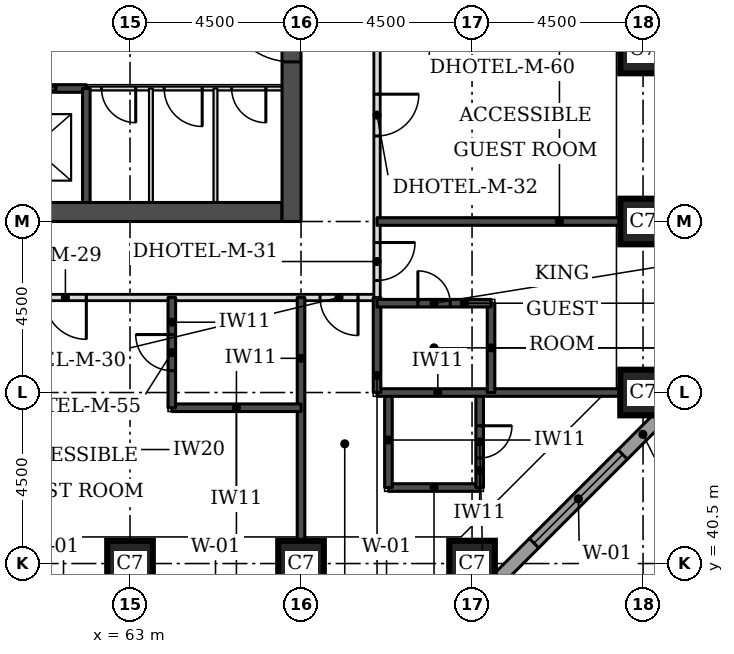
"""IFC4 building model, lengths in metres.
Left out: names, types, materials, properties, quantities, classifications, styles, units other than length and angle.
Written with IfcOpenShell. Run it as: python <this file> out.ifc"""

import sys

from ifc_helpers import new_model, si_unit, direction, frame, frame_2d, origin, origin_2d, place, context, subcontext, project, spatial, rectangle, extrude, element, fill, save


model = new_model("IFC4")
c1 = context("Model", 3, precision=1e-05, world=origin(), true_north=direction((0.0, 1.0)))
c2 = subcontext(c1, "Body", "Model", "MODEL_VIEW")
j1 = project(units=[si_unit("LENGTHUNIT", "METRE"), si_unit("PLANEANGLEUNIT", "RADIAN")], contexts=[c1])
p1 = place(None, origin())
s1 = spatial("IfcSite", under=j1, at=p1, CompositionType="ELEMENT")
p2 = place(p1, origin())
s2 = spatial("IfcBuilding", under=s1, at=p2, CompositionType="ELEMENT")
p3 = place(p2, frame((0.0, 0.0, 23.1)))
s3 = spatial("IfcBuildingStorey", under=s2, at=p3, CompositionType="ELEMENT", Elevation=23.1)
for number, where, z_axis, x_axis in (
    (1, (63.0, 40.5, 0.0), (0.0, 0.0, 1.0), (1.0, 0.0, 0.0)),
    (2, (67.5, 40.5, 0.0), (0.0, 0.0, 1.0), (1.0, 0.0, 0.0)),
    (3, (72.0, 40.5, 0.0), (0.0, 0.0, 1.0), (1.0, 0.0, 0.0)),
    (4, (76.5, 45.0, 0.0), (0.0, 0.0, 1.0), (1.0, 0.0, 0.0)),
    (5, (76.5, 49.5, 0.0), (0.0, 0.0, 1.0), (1.0, 0.0, 0.0)),
    (6, (76.5, 54.0, 0.0), (0.0, 0.0, 1.0), (1.0, 0.0, 0.0)),
):
    element("IfcColumn", number, at=place(p3, frame(where, z_axis=z_axis, x_axis=x_axis)), inside=s3, PredefinedType="COLUMN", context=c2, shape_type="SweptSolid", body=[
        extrude(rectangle(XDim=1.2, YDim=1.2, at=origin_2d()), origin(), (0.0, 0.0, 1.0), 3.3),
    ])
p4 = place(p3, frame((45.5, 49.75, 0.0), z_axis=(0.0, 0.0, 1.0), x_axis=(1.0, 0.0, 0.0)))
e7 = element("IfcWall", 7, at=p4, inside=s3, PredefinedType="SHEAR", context=c2, shape_type="SweptSolid", body=[
    extrude(rectangle(XDim=21.5, YDim=0.5, at=frame_2d((10.75, 0.0))), origin(), (0.0, 0.0, 1.0), 3.3),
])
p5 = place(p3, frame((67.25, 49.5, 0.0), z_axis=(0.0, 0.0, 1.0), x_axis=(0.0, 1.0, 0.0)))
e8 = element("IfcWall", 8, at=p5, inside=s3, PredefinedType="SHEAR", context=c2, shape_type="SweptSolid", body=[
    extrude(rectangle(XDim=22.5, YDim=0.5, at=frame_2d((11.25, 0.0))), origin(), (0.0, 0.0, 1.0), 3.3),
])
p6 = place(p5, frame((4.2, 0.0, 0.0)))
e9 = element("IfcOpeningElement", 9, at=p6, cuts=e8, PredefinedType="OPENING", context=c2, shape_type="SweptSolid", body=[
    extrude(rectangle(XDim=1.8, YDim=2.1, at=frame_2d((0.9, 1.05))), frame((0.0, 0.26, 0.0), z_axis=(0.0, -1.0, 0.0), x_axis=(1.0, 0.0, 0.0)), (0.0, 0.0, 1.0), 0.52),
])
p7 = place(p5, frame((6.9, 0.0, 0.0)))
e10 = element("IfcOpeningElement", 10, at=p7, cuts=e8, PredefinedType="OPENING", context=c2, shape_type="SweptSolid", body=[
    extrude(rectangle(XDim=1.1, YDim=2.1, at=frame_2d((0.55, 1.05))), frame((0.0, 0.26, 0.0), z_axis=(0.0, -1.0, 0.0), x_axis=(1.0, 0.0, 0.0)), (0.0, 0.0, 1.0), 0.52),
])
p8 = place(p5, frame((13.6, 0.0, 0.0)))
e11 = element("IfcOpeningElement", 11, at=p8, cuts=e8, PredefinedType="OPENING", context=c2, shape_type="SweptSolid", body=[
    extrude(rectangle(XDim=1.1, YDim=2.1, at=frame_2d((0.55, 1.05))), frame((0.0, 0.26, 0.0), z_axis=(0.0, -1.0, 0.0), x_axis=(1.0, 0.0, 0.0)), (0.0, 0.0, 1.0), 0.52),
])
p9 = place(p5, frame((16.5, 0.0, 0.0)))
e12 = element("IfcOpeningElement", 12, at=p9, cuts=e8, PredefinedType="OPENING", context=c2, shape_type="SweptSolid", body=[
    extrude(rectangle(XDim=1.8, YDim=2.1, at=frame_2d((0.9, 1.05))), frame((0.0, 0.26, 0.0), z_axis=(0.0, -1.0, 0.0), x_axis=(1.0, 0.0, 0.0)), (0.0, 0.0, 1.0), 0.52),
])
p10 = place(p3, frame((72.27, 39.674, 0.0), z_axis=(0.0, 0.0, 1.0), x_axis=(0.707106781187, 0.707106781187, 0.0)))
e13 = element("IfcWall", 13, at=p10, inside=s3, PredefinedType="STANDARD", context=c2, shape_type="SweptSolid", body=[
    extrude(rectangle(XDim=7.151, YDim=0.35, at=frame_2d((3.576, 0.0))), origin(), (0.0, 0.0, 1.0), 3.055),
])
p11 = place(p10, frame((1.926, 0.0, 0.8)))
e14 = element("IfcOpeningElement", 14, at=p11, cuts=e13, PredefinedType="OPENING", context=c2, shape_type="SweptSolid", body=[
    extrude(rectangle(XDim=3.3, YDim=1.5, at=frame_2d((1.65, 0.75))), frame((0.0, 0.185, 0.0), z_axis=(0.0, -1.0, 0.0), x_axis=(1.0, 0.0, 0.0)), (0.0, 0.0, 1.0), 0.37),
])
p12 = place(p3, frame((52.1, 47.5, 0.0), z_axis=(0.0, 0.0, 1.0), x_axis=(1.0, 0.0, 0.0)))
e15 = element("IfcWall", 15, at=p12, inside=s3, PredefinedType="PARTITIONING", context=c2, shape_type="SweptSolid", body=[
    extrude(rectangle(XDim=17.4, YDim=0.15, at=frame_2d((8.7, 0.0))), origin(), (0.0, 0.0, 1.0), 3.08),
])
p13 = place(p12, frame((8.65, 0.0, 0.0)))
e16 = element("IfcOpeningElement", 16, at=p13, cuts=e15, PredefinedType="OPENING", context=c2, shape_type="SweptSolid", body=[
    extrude(rectangle(XDim=1.1, YDim=2.1, at=frame_2d((0.55, 1.05))), frame((0.0, 0.085, 0.0), z_axis=(0.0, -1.0, 0.0), x_axis=(1.0, 0.0, 0.0)), (0.0, 0.0, 1.0), 0.17),
])
p14 = place(p12, frame((15.9, 0.0, 0.0)))
e17 = element("IfcOpeningElement", 17, at=p14, cuts=e15, PredefinedType="OPENING", context=c2, shape_type="SweptSolid", body=[
    extrude(rectangle(XDim=1.0, YDim=2.1, at=frame_2d((0.5, 1.05))), frame((0.0, 0.085, 0.0), z_axis=(0.0, -1.0, 0.0), x_axis=(1.0, 0.0, 0.0)), (0.0, 0.0, 1.0), 0.17),
])
p15 = place(p3, frame((69.5, 47.5, 0.0), z_axis=(0.0, 0.0, 1.0), x_axis=(0.0, 1.0, 0.0)))
e18 = element("IfcWall", 18, at=p15, inside=s3, PredefinedType="PARTITIONING", context=c2, shape_type="SweptSolid", body=[
    extrude(rectangle(XDim=26.5, YDim=0.15, at=frame_2d((13.25, 0.0))), origin(), (0.0, 0.0, 1.0), 3.08),
])
p16 = place(p15, frame((25.053, 0.0, 0.0)))
e19 = element("IfcOpeningElement", 19, at=p16, cuts=e18, PredefinedType="OPENING", context=c2, shape_type="SweptSolid", body=[
    extrude(rectangle(XDim=1.0, YDim=2.1, at=frame_2d((0.5, 1.05))), frame((0.0, 0.085, 0.0), z_axis=(0.0, -1.0, 0.0), x_axis=(1.0, 0.0, 0.0)), (0.0, 0.0, 1.0), 0.17),
])
p17 = place(p15, frame((22.925, 0.0, 0.0)))
e20 = element("IfcOpeningElement", 20, at=p17, cuts=e18, PredefinedType="OPENING", context=c2, shape_type="SweptSolid", body=[
    extrude(rectangle(XDim=1.0, YDim=2.1, at=frame_2d((0.5, 1.05))), frame((0.0, 0.085, 0.0), z_axis=(0.0, -1.0, 0.0), x_axis=(1.0, 0.0, 0.0)), (0.0, 0.0, 1.0), 0.17),
])
p18 = place(p15, frame((16.325, 0.0, 0.0)))
e21 = element("IfcOpeningElement", 21, at=p18, cuts=e18, PredefinedType="OPENING", context=c2, shape_type="SweptSolid", body=[
    extrude(rectangle(XDim=1.0, YDim=2.1, at=frame_2d((0.5, 1.05))), frame((0.0, 0.085, 0.0), z_axis=(0.0, -1.0, 0.0), x_axis=(1.0, 0.0, 0.0)), (0.0, 0.0, 1.0), 0.17),
])
p19 = place(p15, frame((13.925, 0.0, 0.0)))
e22 = element("IfcOpeningElement", 22, at=p19, cuts=e18, PredefinedType="OPENING", context=c2, shape_type="SweptSolid", body=[
    extrude(rectangle(XDim=1.0, YDim=2.1, at=frame_2d((0.5, 1.05))), frame((0.0, 0.085, 0.0), z_axis=(0.0, -1.0, 0.0), x_axis=(1.0, 0.0, 0.0)), (0.0, 0.0, 1.0), 0.17),
])
p20 = place(p15, frame((4.25, 0.0, 0.0)))
e23 = element("IfcOpeningElement", 23, at=p20, cuts=e18, PredefinedType="OPENING", context=c2, shape_type="SweptSolid", body=[
    extrude(rectangle(XDim=1.1, YDim=2.1, at=frame_2d((0.55, 1.05))), frame((0.0, 0.085, 0.0), z_axis=(0.0, -1.0, 0.0), x_axis=(1.0, 0.0, 0.0)), (0.0, 0.0, 1.0), 0.17),
])
p21 = place(p15, frame((0.447, 0.0, 0.0)))
e24 = element("IfcOpeningElement", 24, at=p21, cuts=e18, PredefinedType="OPENING", context=c2, shape_type="SweptSolid", body=[
    extrude(rectangle(XDim=1.0, YDim=2.1, at=frame_2d((0.5, 1.05))), frame((0.0, 0.085, 0.0), z_axis=(0.0, -1.0, 0.0), x_axis=(1.0, 0.0, 0.0)), (0.0, 0.0, 1.0), 0.17),
])
p22 = place(p3, frame((67.5, 41.1, 0.0), z_axis=(0.0, 0.0, 1.0), x_axis=(0.0, 1.0, 0.0)))
e25 = element("IfcWall", 25, at=p22, inside=s3, PredefinedType="SOLIDWALL", context=c2, shape_type="SweptSolid", body=[
    extrude(rectangle(XDim=6.4, YDim=0.2, at=frame_2d((3.2, 0.0))), origin(), (0.0, 0.0, 1.0), 3.08),
])
p23 = place(p3, frame((69.8, 42.5, 0.0), z_axis=(0.0, 0.0, 1.0), x_axis=(1.0, 0.0, 0.0)))
e26 = element("IfcWall", 26, at=p23, inside=s3, PredefinedType="SOLIDWALL", context=c2, shape_type="SweptSolid", body=[
    extrude(rectangle(XDim=2.4, YDim=0.2, at=frame_2d((1.2, 0.0))), origin(), (0.0, 0.0, 1.0), 3.08),
])
p24 = place(p3, frame((69.8, 42.5, 0.0), z_axis=(0.0, 0.0, 1.0), x_axis=(0.0, 1.0, 0.0)))
e27 = element("IfcWall", 27, at=p24, inside=s3, PredefinedType="SOLIDWALL", context=c2, shape_type="SweptSolid", body=[
    extrude(rectangle(XDim=2.5, YDim=0.2, at=frame_2d((1.25, 0.0))), origin(), (0.0, 0.0, 1.0), 3.08),
])
p25 = place(p3, frame((72.2, 42.5, 0.0), z_axis=(0.0, 0.0, 1.0), x_axis=(0.0, 1.0, 0.0)))
e28 = element("IfcWall", 28, at=p25, inside=s3, PredefinedType="SOLIDWALL", context=c2, shape_type="SweptSolid", body=[
    extrude(rectangle(XDim=2.5, YDim=0.2, at=frame_2d((1.25, 0.0))), origin(), (0.0, 0.0, 1.0), 3.08),
])
p26 = place(p25, frame((0.775, 0.0, 0.0)))
e29 = element("IfcOpeningElement", 29, at=p26, cuts=e28, PredefinedType="OPENING", context=c2, shape_type="SweptSolid", body=[
    extrude(rectangle(XDim=0.85, YDim=2.1, at=frame_2d((0.425, 1.05))), frame((0.0, 0.11, 0.0), z_axis=(0.0, -1.0, 0.0), x_axis=(1.0, 0.0, 0.0)), (0.0, 0.0, 1.0), 0.22),
])
p27 = place(p3, frame((64.1, 44.6, 0.0), z_axis=(0.0, 0.0, 1.0), x_axis=(1.0, 0.0, 0.0)))
e30 = element("IfcWall", 30, at=p27, inside=s3, PredefinedType="SOLIDWALL", context=c2, shape_type="SweptSolid", body=[
    extrude(rectangle(XDim=3.4, YDim=0.2, at=frame_2d((1.7, 0.0))), origin(), (0.0, 0.0, 1.0), 3.08),
])
p28 = place(p3, frame((64.1, 44.6, 0.0), z_axis=(0.0, 0.0, 1.0), x_axis=(0.0, 1.0, 0.0)))
e31 = element("IfcWall", 31, at=p28, inside=s3, PredefinedType="SOLIDWALL", context=c2, shape_type="SweptSolid", body=[
    extrude(rectangle(XDim=2.9, YDim=0.2, at=frame_2d((1.45, 0.0))), origin(), (0.0, 0.0, 1.0), 3.08),
])
p29 = place(p28, frame((0.975, 0.0, 0.0)))
e32 = element("IfcOpeningElement", 32, at=p29, cuts=e31, PredefinedType="OPENING", context=c2, shape_type="SweptSolid", body=[
    extrude(rectangle(XDim=0.95, YDim=2.1, at=frame_2d((0.475, 1.05))), frame((0.0, 0.11, 0.0), z_axis=(0.0, -1.0, 0.0), x_axis=(1.0, 0.0, 0.0)), (0.0, 0.0, 1.0), 0.22),
])
p30 = place(p3, frame((69.5, 45.0, 0.0), z_axis=(0.0, 0.0, 1.0), x_axis=(1.0, 0.0, 0.0)))
e33 = element("IfcWall", 33, at=p30, inside=s3, PredefinedType="SOLIDWALL", context=c2, shape_type="SweptSolid", body=[
    extrude(rectangle(XDim=6.4, YDim=0.2, at=frame_2d((3.2, 0.0))), origin(), (0.0, 0.0, 1.0), 3.08),
])
p31 = place(p3, frame((69.5, 45.0, 0.0), z_axis=(0.0, 0.0, 1.0), x_axis=(0.0, 1.0, 0.0)))
e34 = element("IfcWall", 34, at=p31, inside=s3, PredefinedType="SOLIDWALL", context=c2, shape_type="SweptSolid", body=[
    extrude(rectangle(XDim=2.5, YDim=0.2, at=frame_2d((1.25, 0.0))), origin(), (0.0, 0.0, 1.0), 3.08),
])
p32 = place(p3, frame((72.5, 45.0, 0.0), z_axis=(0.0, 0.0, 1.0), x_axis=(0.0, 1.0, 0.0)))
e35 = element("IfcWall", 35, at=p32, inside=s3, PredefinedType="SOLIDWALL", context=c2, shape_type="SweptSolid", body=[
    extrude(rectangle(XDim=2.35, YDim=0.2, at=frame_2d((1.175, 0.0))), origin(), (0.0, 0.0, 1.0), 3.08),
])
p33 = place(p3, frame((69.5, 47.35, 0.0), z_axis=(0.0, 0.0, 1.0), x_axis=(1.0, 0.0, 0.0)))
e36 = element("IfcWall", 36, at=p33, inside=s3, PredefinedType="SOLIDWALL", context=c2, shape_type="SweptSolid", body=[
    extrude(rectangle(XDim=3.0, YDim=0.2, at=frame_2d((1.5, 0.0))), origin(), (0.0, 0.0, 1.0), 3.08),
])
p34 = place(p33, frame((1.075, 0.0, 0.0)))
e37 = element("IfcOpeningElement", 37, at=p34, cuts=e36, PredefinedType="OPENING", context=c2, shape_type="SweptSolid", body=[
    extrude(rectangle(XDim=0.85, YDim=2.1, at=frame_2d((0.425, 1.05))), frame((0.0, 0.11, 0.0), z_axis=(0.0, -1.0, 0.0), x_axis=(1.0, 0.0, 0.0)), (0.0, 0.0, 1.0), 0.22),
])
p35 = place(p3, frame((69.5, 49.5, 0.0), z_axis=(0.0, 0.0, 1.0), x_axis=(1.0, 0.0, 0.0)))
e38 = element("IfcWall", 38, at=p35, inside=s3, PredefinedType="SOLIDWALL", context=c2, shape_type="SweptSolid", body=[
    extrude(rectangle(XDim=6.4, YDim=0.2, at=frame_2d((3.2, 0.0))), origin(), (0.0, 0.0, 1.0), 3.08),
])
p36 = place(p3, frame((61.85, 53.0, 0.0), z_axis=(0.0, 0.0, 1.0), x_axis=(1.0, 0.0, 0.0)))
e39 = element("IfcWall", 39, at=p36, inside=s3, PredefinedType="PARTITIONING", context=c2, shape_type="SweptSolid", body=[
    extrude(rectangle(XDim=5.15, YDim=0.1, at=frame_2d((2.575, 0.0))), origin(), (0.0, 0.0, 1.0), 3.08),
])
p37 = place(p36, frame((3.824, 0.0, 0.0)))
e40 = element("IfcOpeningElement", 40, at=p37, cuts=e39, PredefinedType="OPENING", context=c2, shape_type="SweptSolid", body=[
    extrude(rectangle(XDim=0.9, YDim=2.1, at=frame_2d((0.45, 1.05))), frame((0.0, 0.06, 0.0), z_axis=(0.0, -1.0, 0.0), x_axis=(1.0, 0.0, 0.0)), (0.0, 0.0, 1.0), 0.12),
])
p38 = place(p36, frame((2.049, 0.0, 0.0)))
e41 = element("IfcOpeningElement", 41, at=p38, cuts=e39, PredefinedType="OPENING", context=c2, shape_type="SweptSolid", body=[
    extrude(rectangle(XDim=1.0, YDim=2.1, at=frame_2d((0.5, 1.05))), frame((0.0, 0.06, 0.0), z_axis=(0.0, -1.0, 0.0), x_axis=(1.0, 0.0, 0.0)), (0.0, 0.0, 1.0), 0.12),
])
p39 = place(p36, frame((0.4, 0.0, 0.0)))
e42 = element("IfcOpeningElement", 42, at=p39, cuts=e39, PredefinedType="OPENING", context=c2, shape_type="SweptSolid", body=[
    extrude(rectangle(XDim=0.9, YDim=2.1, at=frame_2d((0.45, 1.05))), frame((0.0, 0.06, 0.0), z_axis=(0.0, -1.0, 0.0), x_axis=(1.0, 0.0, 0.0)), (0.0, 0.0, 1.0), 0.12),
])
p40 = place(p3, frame((50.65, 53.0, 0.0), z_axis=(0.0, 0.0, 1.0), x_axis=(1.0, 0.0, 0.0)))
e43 = element("IfcWall", 43, at=p40, inside=s3, PredefinedType="SOLIDWALL", context=c2, shape_type="SweptSolid", body=[
    extrude(rectangle(XDim=11.2, YDim=0.2, at=frame_2d((5.6, 0.0))), origin(), (0.0, 0.0, 1.0), 3.08),
])
p41 = place(p40, frame((0.8, 0.0, 0.0)))
e44 = element("IfcOpeningElement", 44, at=p41, cuts=e43, PredefinedType="OPENING", context=c2, shape_type="SweptSolid", body=[
    extrude(rectangle(XDim=1.2, YDim=2.1, at=frame_2d((0.6, 1.05))), frame((0.0, 0.11, 0.0), z_axis=(0.0, -1.0, 0.0), x_axis=(1.0, 0.0, 0.0)), (0.0, 0.0, 1.0), 0.22),
])
p42 = place(p40, frame((3.6, 0.0, 0.0)))
e45 = element("IfcOpeningElement", 45, at=p42, cuts=e43, PredefinedType="OPENING", context=c2, shape_type="SweptSolid", body=[
    extrude(rectangle(XDim=1.2, YDim=2.1, at=frame_2d((0.6, 1.05))), frame((0.0, 0.11, 0.0), z_axis=(0.0, -1.0, 0.0), x_axis=(1.0, 0.0, 0.0)), (0.0, 0.0, 1.0), 0.22),
])
p43 = place(p40, frame((6.4, 0.0, 0.0)))
e46 = element("IfcOpeningElement", 46, at=p43, cuts=e43, PredefinedType="OPENING", context=c2, shape_type="SweptSolid", body=[
    extrude(rectangle(XDim=1.2, YDim=2.1, at=frame_2d((0.6, 1.05))), frame((0.0, 0.11, 0.0), z_axis=(0.0, -1.0, 0.0), x_axis=(1.0, 0.0, 0.0)), (0.0, 0.0, 1.0), 0.22),
])
p44 = place(p40, frame((9.2, 0.0, 0.0)))
e47 = element("IfcOpeningElement", 47, at=p44, cuts=e43, PredefinedType="OPENING", context=c2, shape_type="SweptSolid", body=[
    extrude(rectangle(XDim=1.2, YDim=2.1, at=frame_2d((0.6, 1.05))), frame((0.0, 0.11, 0.0), z_axis=(0.0, -1.0, 0.0), x_axis=(1.0, 0.0, 0.0)), (0.0, 0.0, 1.0), 0.22),
])
p45 = place(p3, frame((61.85, 50.0, 0.0), z_axis=(0.0, 0.0, 1.0), x_axis=(0.0, 1.0, 0.0)))
e48 = element("IfcWall", 48, at=p45, inside=s3, PredefinedType="SOLIDWALL", context=c2, shape_type="SweptSolid", body=[
    extrude(rectangle(XDim=3.0, YDim=0.2, at=frame_2d((1.5, 0.0))), origin(), (0.0, 0.0, 1.0), 3.08),
])
for number, where, z_axis, x_axis in (
    (49, (63.55, 50.0, 0.0), (0.0, 0.0, 1.0), (0.0, 1.0, 0.0)),
    (50, (65.249, 50.0, 0.0), (0.0, 0.0, 1.0), (0.0, 1.0, 0.0)),
):
    element("IfcWall", number, at=place(p3, frame(where, z_axis=z_axis, x_axis=x_axis)), inside=s3, PredefinedType="PARTITIONING", context=c2, shape_type="SweptSolid", body=[
        extrude(rectangle(XDim=3.0, YDim=0.1, at=frame_2d((1.5, 0.0))), origin(), (0.0, 0.0, 1.0), 3.08),
    ])
p46 = place(p11, origin())
e51 = element("IfcWindow", 51, at=p46, inside=s3, PartitioningType="SINGLE_PANEL", PredefinedType="WINDOW", context=c2, shape_type="SweptSolid", body=[
    extrude(rectangle(XDim=3.3, YDim=1.5, at=frame_2d((1.65, 0.75))), frame((0.0, 0.085, 0.0), z_axis=(0.0, -1.0, 0.0), x_axis=(1.0, 0.0, 0.0)), (0.0, 0.0, 1.0), 0.06),
])
fill(e14, e51)
p47 = place(p20, frame((1.1, 0.0, 0.0), z_axis=(0.0, 0.0, 1.0), x_axis=(-1.0, 0.0, 0.0)))
e52 = element("IfcDoor", 52, at=p47, inside=s3, OperationType="SINGLE_SWING_LEFT", PredefinedType="DOOR", context=c2, shape_type="SweptSolid", body=[
    extrude(rectangle(XDim=1.1, YDim=2.1, at=frame_2d((0.55, 1.05))), frame((0.0, 0.025, 0.0), z_axis=(0.0, -1.0, 0.0), x_axis=(1.0, 0.0, 0.0)), (0.0, 0.0, 1.0), 0.05),
])
fill(e23, e52)
p48 = place(p21, frame((1.0, 0.0, 0.0), z_axis=(0.0, 0.0, 1.0), x_axis=(-1.0, 0.0, 0.0)))
e53 = element("IfcDoor", 53, at=p48, inside=s3, OperationType="SINGLE_SWING_LEFT", PredefinedType="DOOR", context=c2, shape_type="SweptSolid", body=[
    extrude(rectangle(XDim=1.0, YDim=2.1, at=frame_2d((0.5, 1.05))), frame((0.0, 0.025, 0.0), z_axis=(0.0, -1.0, 0.0), x_axis=(1.0, 0.0, 0.0)), (0.0, 0.0, 1.0), 0.05),
])
fill(e24, e53)
p49 = place(p34, origin())
e54 = element("IfcDoor", 54, at=p49, inside=s3, OperationType="SINGLE_SWING_LEFT", PredefinedType="DOOR", context=c2, shape_type="SweptSolid", body=[
    extrude(rectangle(XDim=0.85, YDim=2.1, at=frame_2d((0.425, 1.05))), frame((0.0, 0.025, 0.0), z_axis=(0.0, -1.0, 0.0), x_axis=(1.0, 0.0, 0.0)), (0.0, 0.0, 1.0), 0.05),
])
fill(e37, e54)
p50 = place(p13, frame((1.1, 0.0, 0.0), z_axis=(0.0, 0.0, 1.0), x_axis=(-1.0, 0.0, 0.0)))
e55 = element("IfcDoor", 55, at=p50, inside=s3, OperationType="SINGLE_SWING_LEFT", PredefinedType="DOOR", context=c2, shape_type="SweptSolid", body=[
    extrude(rectangle(XDim=1.1, YDim=2.1, at=frame_2d((0.55, 1.05))), frame((0.0, 0.025, 0.0), z_axis=(0.0, -1.0, 0.0), x_axis=(1.0, 0.0, 0.0)), (0.0, 0.0, 1.0), 0.05),
])
fill(e16, e55)
p51 = place(p29, origin())
e56 = element("IfcDoor", 56, at=p51, inside=s3, OperationType="SINGLE_SWING_RIGHT", PredefinedType="DOOR", context=c2, shape_type="SweptSolid", body=[
    extrude(rectangle(XDim=0.95, YDim=2.1, at=frame_2d((0.475, 1.05))), frame((0.0, 0.025, 0.0), z_axis=(0.0, -1.0, 0.0), x_axis=(1.0, 0.0, 0.0)), (0.0, 0.0, 1.0), 0.05),
])
fill(e32, e56)
p52 = place(p14, frame((1.0, 0.0, 0.0), z_axis=(0.0, 0.0, 1.0), x_axis=(-1.0, 0.0, 0.0)))
e57 = element("IfcDoor", 57, at=p52, inside=s3, OperationType="SINGLE_SWING_LEFT", PredefinedType="DOOR", context=c2, shape_type="SweptSolid", body=[
    extrude(rectangle(XDim=1.0, YDim=2.1, at=frame_2d((0.5, 1.05))), frame((0.0, 0.025, 0.0), z_axis=(0.0, -1.0, 0.0), x_axis=(1.0, 0.0, 0.0)), (0.0, 0.0, 1.0), 0.05),
])
fill(e17, e57)
p53 = place(p26, frame((0.85, 0.0, 0.0), z_axis=(0.0, 0.0, 1.0), x_axis=(-1.0, 0.0, 0.0)))
e58 = element("IfcDoor", 58, at=p53, inside=s3, OperationType="SINGLE_SWING_LEFT", PredefinedType="DOOR", context=c2, shape_type="SweptSolid", body=[
    extrude(rectangle(XDim=0.85, YDim=2.1, at=frame_2d((0.425, 1.05))), frame((0.0, 0.025, 0.0), z_axis=(0.0, -1.0, 0.0), x_axis=(1.0, 0.0, 0.0)), (0.0, 0.0, 1.0), 0.05),
])
fill(e29, e58)
p54 = place(p44, origin())
e59 = element("IfcDoor", 59, at=p54, inside=s3, OperationType="DOUBLE_DOOR_SLIDING", PredefinedType="DOOR", context=c2, shape_type="SweptSolid", body=[
    extrude(rectangle(XDim=1.2, YDim=2.1, at=frame_2d((0.6, 1.05))), frame((0.0, 0.025, 0.0), z_axis=(0.0, -1.0, 0.0), x_axis=(1.0, 0.0, 0.0)), (0.0, 0.0, 1.0), 0.05),
])
fill(e47, e59)
p55 = place(p6, origin())
e60 = element("IfcDoor", 60, at=p55, inside=s3, OperationType="SINGLE_SWING_RIGHT", PredefinedType="DOOR", context=c2, shape_type="SweptSolid", body=[
    extrude(rectangle(XDim=1.8, YDim=2.1, at=frame_2d((0.9, 1.05))), frame((0.0, 0.025, 0.0), z_axis=(0.0, -1.0, 0.0), x_axis=(1.0, 0.0, 0.0)), (0.0, 0.0, 1.0), 0.05),
])
fill(e9, e60)
p56 = place(p37, frame((0.9, 0.0, 0.0), z_axis=(0.0, 0.0, 1.0), x_axis=(-1.0, 0.0, 0.0)))
e61 = element("IfcDoor", 61, at=p56, inside=s3, OperationType="SINGLE_SWING_LEFT", PredefinedType="DOOR", context=c2, shape_type="SweptSolid", body=[
    extrude(rectangle(XDim=0.9, YDim=2.1, at=frame_2d((0.45, 1.05))), frame((0.0, 0.025, 0.0), z_axis=(0.0, -1.0, 0.0), x_axis=(1.0, 0.0, 0.0)), (0.0, 0.0, 1.0), 0.05),
])
fill(e40, e61)
p57 = place(p38, frame((1.0, 0.0, 0.0), z_axis=(0.0, 0.0, 1.0), x_axis=(-1.0, 0.0, 0.0)))
e62 = element("IfcDoor", 62, at=p57, inside=s3, OperationType="SINGLE_SWING_LEFT", PredefinedType="DOOR", context=c2, shape_type="SweptSolid", body=[
    extrude(rectangle(XDim=1.0, YDim=2.1, at=frame_2d((0.5, 1.05))), frame((0.0, 0.025, 0.0), z_axis=(0.0, -1.0, 0.0), x_axis=(1.0, 0.0, 0.0)), (0.0, 0.0, 1.0), 0.05),
])
fill(e41, e62)
p58 = place(p39, frame((0.9, 0.0, 0.0), z_axis=(0.0, 0.0, 1.0), x_axis=(-1.0, 0.0, 0.0)))
e63 = element("IfcDoor", 63, at=p58, inside=s3, OperationType="SINGLE_SWING_LEFT", PredefinedType="DOOR", context=c2, shape_type="SweptSolid", body=[
    extrude(rectangle(XDim=0.9, YDim=2.1, at=frame_2d((0.45, 1.05))), frame((0.0, 0.025, 0.0), z_axis=(0.0, -1.0, 0.0), x_axis=(1.0, 0.0, 0.0)), (0.0, 0.0, 1.0), 0.05),
])
fill(e42, e63)
save(model, sys.argv[1])
